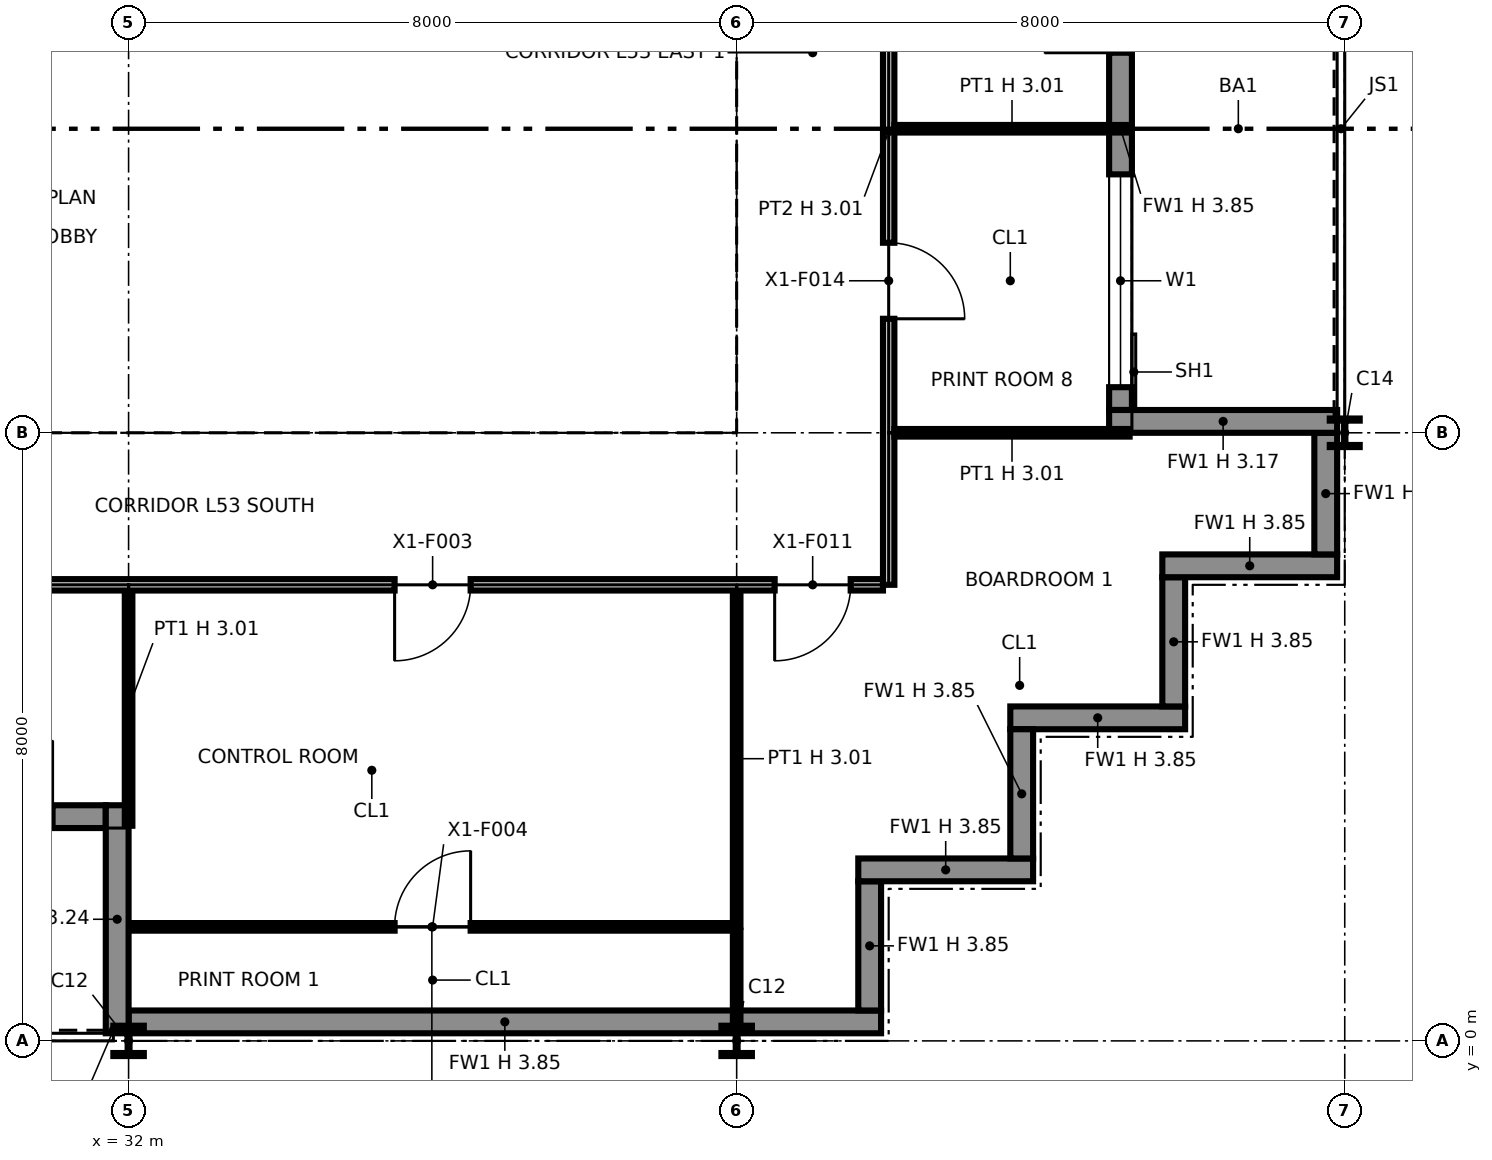
"""IFC4 building model, lengths in metres.
Left out: names, types, materials, properties, quantities, classifications, styles, units other than length and angle.
Written with IfcOpenShell. Run it as: python <this file> out.ifc"""

import sys

from ifc_helpers import new_model, si_unit, direction, frame, frame_2d, origin, origin_2d, place, context, subcontext, project, spatial, polyline, rectangle, i_section, outline, extrude, element, fill, save


model = new_model("IFC4")
c1 = context("Model", 3, precision=1e-05, world=origin(), true_north=direction((0.0, 1.0)))
c2 = subcontext(c1, "Body", "Model", "MODEL_VIEW")
j1 = project(units=[si_unit("LENGTHUNIT", "METRE"), si_unit("PLANEANGLEUNIT", "RADIAN")], contexts=[c1])
p1 = place(None, origin())
s1 = spatial("IfcSite", under=j1, at=p1, CompositionType="ELEMENT")
p2 = place(p1, origin())
s2 = spatial("IfcBuilding", under=s1, at=p2, CompositionType="ELEMENT")
p3 = place(p2, frame((0.0, 0.0, 247.0)))
s3 = spatial("IfcBuildingStorey", under=s2, at=p3, CompositionType="ELEMENT", Elevation=247.0)
p4 = place(p3, frame((32.0, 0.0, 0.0), z_axis=(0.0, 0.0, 1.0), x_axis=(1.0, 0.0, 0.0)))
e1 = element("IfcColumn", 1, at=p4, inside=s3, PredefinedType="COLUMN", context=c2, shape_type="SweptSolid", body=[
    extrude(i_section(OverallWidth=0.401, OverallDepth=0.399, WebThickness=0.025, FlangeThickness=0.04, at=origin_2d()), origin(), (0.0, 0.0, 1.0), 3.85),
])
p5 = place(p3, frame((32.0, 8.0, 0.0), z_axis=(0.0, 0.0, 1.0), x_axis=(1.0, 0.0, 0.0)))
e2 = element("IfcColumn", 2, at=p5, inside=s3, PredefinedType="COLUMN", context=c2, shape_type="SweptSolid", body=[
    extrude(i_section(OverallWidth=0.371, OverallDepth=0.361, WebThickness=0.012, FlangeThickness=0.02, at=origin_2d()), origin(), (0.0, 0.0, 1.0), 3.85),
])
p6 = place(p3, frame((40.0, 0.0, 0.0), z_axis=(0.0, 0.0, 1.0), x_axis=(1.0, 0.0, 0.0)))
e3 = element("IfcColumn", 3, at=p6, inside=s3, PredefinedType="COLUMN", context=c2, shape_type="SweptSolid", body=[
    extrude(i_section(OverallWidth=0.401, OverallDepth=0.399, WebThickness=0.025, FlangeThickness=0.04, at=origin_2d()), origin(), (0.0, 0.0, 1.0), 3.85),
])
p7 = place(p3, frame((40.0, 8.0, 0.0), z_axis=(0.0, 0.0, 1.0), x_axis=(1.0, 0.0, 0.0)))
e4 = element("IfcColumn", 4, at=p7, inside=s3, PredefinedType="COLUMN", context=c2, shape_type="SweptSolid", body=[
    extrude(i_section(OverallWidth=0.371, OverallDepth=0.361, WebThickness=0.012, FlangeThickness=0.02, at=origin_2d()), origin(), (0.0, 0.0, 1.0), 3.85),
])
p8 = place(p3, frame((48.0, 8.0, 0.0), z_axis=(0.0, 0.0, 1.0), x_axis=(1.0, 0.0, 0.0)))
e5 = element("IfcColumn", 5, at=p8, inside=s3, PredefinedType="COLUMN", context=c2, shape_type="SweptSolid", body=[
    extrude(i_section(OverallWidth=0.394, OverallDepth=0.376, WebThickness=0.017, FlangeThickness=0.028, at=origin_2d()), origin(), (0.0, 0.0, 1.0), 3.85),
])
p9 = place(p3, frame((24.3, 2.95, 0.0), z_axis=(0.0, 0.0, 1.0), x_axis=(1.0, 0.0, 0.0)))
e6 = element("IfcWall", 6, at=p9, inside=s3, PredefinedType="SOLIDWALL", context=c2, shape_type="SweptSolid", body=[
    extrude(rectangle(XDim=7.4, YDim=0.3, at=frame_2d((3.7, 0.0))), origin(), (0.0, 0.0, 1.0), 3.85),
])
p10 = place(p9, frame((0.3, 0.0, 0.9)))
e7 = element("IfcOpeningElement", 7, at=p10, cuts=e6, PredefinedType="OPENING", context=c2, shape_type="SweptSolid", body=[
    extrude(rectangle(XDim=2.8, YDim=2.2, at=frame_2d((1.4, 1.1))), frame((0.0, 0.16, 0.0), z_axis=(0.0, -1.0, 0.0), x_axis=(1.0, 0.0, 0.0)), (0.0, 0.0, 1.0), 0.32),
])
p11 = place(p9, frame((4.7, 0.0, 0.0)))
e8 = element("IfcOpeningElement", 8, at=p11, cuts=e6, PredefinedType="OPENING", context=c2, shape_type="SweptSolid", body=[
    extrude(rectangle(XDim=2.0, YDim=2.4, at=frame_2d((1.0, 1.2))), frame((0.0, 0.16, 0.0), z_axis=(0.0, -1.0, 0.0), x_axis=(1.0, 0.0, 0.0)), (0.0, 0.0, 1.0), 0.32),
])
p12 = place(p3, frame((31.85, 0.1, 0.0), z_axis=(0.0, 0.0, 1.0), x_axis=(0.0, 1.0, 0.0)))
e9 = element("IfcWall", 9, at=p12, inside=s3, PredefinedType="SOLIDWALL", context=c2, shape_type="SweptSolid", body=[
    extrude(rectangle(XDim=3.0, YDim=0.3, at=frame_2d((1.5, 0.0))), origin(), (0.0, 0.0, 1.0), 3.237),
])
p13 = place(p3, frame((32.0, 0.25, 0.0), z_axis=(0.0, 0.0, 1.0), x_axis=(1.0, 0.0, 0.0)))
e10 = element("IfcWall", 10, at=p13, inside=s3, PredefinedType="SOLIDWALL", context=c2, shape_type="SweptSolid", body=[
    extrude(rectangle(XDim=9.9, YDim=0.3, at=frame_2d((4.95, 0.0))), origin(), (0.0, 0.0, 1.0), 3.85),
])
p14 = place(p3, frame((41.75, 0.4, 0.0), z_axis=(0.0, 0.0, 1.0), x_axis=(0.0, 1.0, 0.0)))
e11 = element("IfcWall", 11, at=p14, inside=s3, PredefinedType="SOLIDWALL", context=c2, shape_type="SweptSolid", body=[
    extrude(rectangle(XDim=1.7, YDim=0.3, at=frame_2d((0.85, 0.0))), origin(), (0.0, 0.0, 1.0), 3.85),
])
p15 = place(p3, frame((41.6, 2.25, 0.0), z_axis=(0.0, 0.0, 1.0), x_axis=(1.0, 0.0, 0.0)))
e12 = element("IfcWall", 12, at=p15, inside=s3, PredefinedType="SOLIDWALL", context=c2, shape_type="SweptSolid", body=[
    extrude(rectangle(XDim=2.3, YDim=0.3, at=frame_2d((1.15, 0.0))), origin(), (0.0, 0.0, 1.0), 3.85),
])
p16 = place(p3, frame((43.75, 2.4, 0.0), z_axis=(0.0, 0.0, 1.0), x_axis=(0.0, 1.0, 0.0)))
e13 = element("IfcWall", 13, at=p16, inside=s3, PredefinedType="SOLIDWALL", context=c2, shape_type="SweptSolid", body=[
    extrude(rectangle(XDim=1.7, YDim=0.3, at=frame_2d((0.85, 0.0))), origin(), (0.0, 0.0, 1.0), 3.85),
])
p17 = place(p3, frame((43.6, 4.25, 0.0), z_axis=(0.0, 0.0, 1.0), x_axis=(1.0, 0.0, 0.0)))
e14 = element("IfcWall", 14, at=p17, inside=s3, PredefinedType="SOLIDWALL", context=c2, shape_type="SweptSolid", body=[
    extrude(rectangle(XDim=2.3, YDim=0.3, at=frame_2d((1.15, 0.0))), origin(), (0.0, 0.0, 1.0), 3.85),
])
p18 = place(p3, frame((45.75, 4.4, 0.0), z_axis=(0.0, 0.0, 1.0), x_axis=(0.0, 1.0, 0.0)))
e15 = element("IfcWall", 15, at=p18, inside=s3, PredefinedType="SOLIDWALL", context=c2, shape_type="SweptSolid", body=[
    extrude(rectangle(XDim=1.7, YDim=0.3, at=frame_2d((0.85, 0.0))), origin(), (0.0, 0.0, 1.0), 3.85),
])
p19 = place(p3, frame((45.6, 6.25, 0.0), z_axis=(0.0, 0.0, 1.0), x_axis=(1.0, 0.0, 0.0)))
e16 = element("IfcWall", 16, at=p19, inside=s3, PredefinedType="SOLIDWALL", context=c2, shape_type="SweptSolid", body=[
    extrude(rectangle(XDim=2.3, YDim=0.3, at=frame_2d((1.15, 0.0))), origin(), (0.0, 0.0, 1.0), 3.85),
])
p20 = place(p3, frame((47.75, 6.4, 0.0), z_axis=(0.0, 0.0, 1.0), x_axis=(0.0, 1.0, 0.0)))
e17 = element("IfcWall", 17, at=p20, inside=s3, PredefinedType="SOLIDWALL", context=c2, shape_type="SweptSolid", body=[
    extrude(rectangle(XDim=1.6, YDim=0.3, at=frame_2d((0.8, 0.0))), origin(), (0.0, 0.0, 1.0), 3.85),
])
p21 = place(p3, frame((45.05, 8.3, 0.0), z_axis=(0.0, 0.0, 1.0), x_axis=(0.0, 1.0, 0.0)))
e18 = element("IfcWall", 18, at=p21, inside=s3, PredefinedType="SOLIDWALL", context=c2, shape_type="SweptSolid", body=[
    extrude(rectangle(XDim=7.4, YDim=0.3, at=frame_2d((3.7, 0.0))), origin(), (0.0, 0.0, 1.0), 3.85),
])
p22 = place(p21, frame((0.3, 0.0, 0.9)))
e19 = element("IfcOpeningElement", 19, at=p22, cuts=e18, PredefinedType="OPENING", context=c2, shape_type="SweptSolid", body=[
    extrude(rectangle(XDim=2.8, YDim=2.2, at=frame_2d((1.4, 1.1))), frame((0.0, 0.16, 0.0), z_axis=(0.0, -1.0, 0.0), x_axis=(1.0, 0.0, 0.0)), (0.0, 0.0, 1.0), 0.32),
])
p23 = place(p21, frame((4.7, 0.0, 0.0)))
e20 = element("IfcOpeningElement", 20, at=p23, cuts=e18, PredefinedType="OPENING", context=c2, shape_type="SweptSolid", body=[
    extrude(rectangle(XDim=2.0, YDim=2.4, at=frame_2d((1.0, 1.2))), frame((0.0, 0.16, 0.0), z_axis=(0.0, -1.0, 0.0), x_axis=(1.0, 0.0, 0.0)), (0.0, 0.0, 1.0), 0.32),
])
p24 = place(p3, frame((47.9, 8.15, 0.0), z_axis=(0.0, 0.0, 1.0), x_axis=(-1.0, 0.0, 0.0)))
e21 = element("IfcWall", 21, at=p24, inside=s3, PredefinedType="SOLIDWALL", context=c2, shape_type="SweptSolid", body=[
    extrude(rectangle(XDim=3.0, YDim=0.3, at=frame_2d((1.5, 0.0))), origin(), (0.0, 0.0, 1.0), 3.171),
])
p25 = place(p3, frame((24.65, 8.75, 0.0), z_axis=(0.0, 0.0, 1.0), x_axis=(1.0, 0.0, 0.0)))
e22 = element("IfcWall", 22, at=p25, inside=s3, PredefinedType="PARTITIONING", context=c2, shape_type="SweptSolid", body=[
    extrude(outline(polyline([(0.0, 0.0), (14.7, 0.0), (14.7, 3.85), (7.438, 3.85), (7.438, 3.308), (7.262, 3.308), (7.261, 3.85), (0.0, 3.85), (0.0, 0.0)])), frame((0.0, 0.1, 0.0), z_axis=(0.0, -1.0, 0.0), x_axis=(1.0, 0.0, 0.0)), (0.0, 0.0, 1.0), 0.2),
])
p26 = place(p3, frame((24.85, 11.5, 0.0), z_axis=(0.0, 0.0, 1.0), x_axis=(1.0, 0.0, 0.0)))
e23 = element("IfcWall", 23, at=p26, inside=s3, PredefinedType="PARTITIONING", context=c2, shape_type="SweptSolid", body=[
    extrude(outline(polyline([(0.0, 0.0), (7.45, 0.0), (7.45, 3.85), (7.239, 3.85), (7.238, 3.308), (7.062, 3.308), (7.062, 3.85), (0.0, 3.85), (0.0, 0.0)])), frame((0.0, 0.1, 0.0), z_axis=(0.0, -1.0, 0.0), x_axis=(1.0, 0.0, 0.0)), (0.0, 0.0, 1.0), 0.2),
])
p27 = place(p26, frame((0.575, 0.0, 0.0)))
e24 = element("IfcOpeningElement", 24, at=p27, cuts=e23, PredefinedType="OPENING", context=c2, shape_type="SweptSolid", body=[
    extrude(rectangle(XDim=1.1, YDim=2.1, at=frame_2d((0.55, 1.05))), frame((0.0, 0.11, 0.0), z_axis=(0.0, -1.0, 0.0), x_axis=(1.0, 0.0, 0.0)), (0.0, 0.0, 1.0), 0.22),
])
p28 = place(p26, frame((2.95, 0.0, 0.0)))
e25 = element("IfcOpeningElement", 25, at=p28, cuts=e23, PredefinedType="OPENING", context=c2, shape_type="SweptSolid", body=[
    extrude(rectangle(XDim=1.1, YDim=2.1, at=frame_2d((0.55, 1.05))), frame((0.0, 0.11, 0.0), z_axis=(0.0, -1.0, 0.0), x_axis=(1.0, 0.0, 0.0)), (0.0, 0.0, 1.0), 0.22),
])
p29 = place(p26, frame((5.25, 0.0, 0.0)))
e26 = element("IfcOpeningElement", 26, at=p29, cuts=e23, PredefinedType="OPENING", context=c2, shape_type="SweptSolid", body=[
    extrude(rectangle(XDim=1.1, YDim=2.1, at=frame_2d((0.55, 1.05))), frame((0.0, 0.11, 0.0), z_axis=(0.0, -1.0, 0.0), x_axis=(1.0, 0.0, 0.0)), (0.0, 0.0, 1.0), 0.22),
])
p30 = place(p3, frame((32.0, 8.85, 0.0), z_axis=(0.0, 0.0, 1.0), x_axis=(0.0, 1.0, 0.0)))
e27 = element("IfcWall", 27, at=p30, inside=s3, PredefinedType="PARTITIONING", context=c2, shape_type="SweptSolid", body=[
    extrude(rectangle(XDim=2.55, YDim=0.6, at=frame_2d((1.275, 0.0))), origin(), (0.0, 0.0, 1.0), 3.308),
])
p31 = place(p3, frame((32.0, 11.6, 0.0), z_axis=(0.0, 0.0, 1.0), x_axis=(0.0, 1.0, 0.0)))
e28 = element("IfcWall", 28, at=p31, inside=s3, PredefinedType="PARTITIONING", context=c2, shape_type="SweptSolid", body=[
    extrude(rectangle(XDim=1.8, YDim=0.6, at=frame_2d((0.9, 0.0))), origin(), (0.0, 0.0, 1.0), 3.308),
])
for number, where, z_axis, x_axis in (
    (29, (35.6, 8.85, 0.0), (0.0, 0.0, 1.0), (0.0, 1.0, 0.0)),
    (30, (39.25, 8.85, 0.0), (0.0, 0.0, 1.0), (0.0, 1.0, 0.0)),
):
    element("IfcWall", number, at=place(p3, frame(where, z_axis=z_axis, x_axis=x_axis)), inside=s3, PredefinedType="PARTITIONING", context=c2, shape_type="SweptSolid", body=[
        extrude(rectangle(XDim=6.3, YDim=0.2, at=frame_2d((3.15, 0.0))), origin(), (0.0, 0.0, 1.0), 3.85),
    ])
p32 = place(p3, frame((40.0, 0.13, 0.0), z_axis=(0.0, 0.0, 1.0), x_axis=(0.0, 1.0, 0.0)))
e31 = element("IfcWall", 31, at=p32, inside=s3, PredefinedType="PARTITIONING", context=c2, shape_type="SweptSolid", body=[
    extrude(rectangle(XDim=1.32, YDim=0.1, at=frame_2d((0.66, 0.0))), origin(), (0.0, 0.0, 1.0), 3.014),
])
p33 = place(p3, frame((32.03, 1.5, 0.0), z_axis=(0.0, 0.0, 1.0), x_axis=(1.0, 0.0, 0.0)))
e32 = element("IfcWall", 32, at=p33, inside=s3, PredefinedType="PARTITIONING", context=c2, shape_type="SweptSolid", body=[
    extrude(rectangle(XDim=7.92, YDim=0.1, at=frame_2d((3.96, 0.0))), origin(), (0.0, 0.0, 1.0), 3.85),
])
p34 = place(p33, frame((3.47, 0.0, 0.0)))
e33 = element("IfcOpeningElement", 33, at=p34, cuts=e32, PredefinedType="OPENING", context=c2, shape_type="SweptSolid", body=[
    extrude(rectangle(XDim=1.0, YDim=2.1, at=frame_2d((0.5, 1.05))), frame((0.0, 0.06, 0.0), z_axis=(0.0, -1.0, 0.0), x_axis=(1.0, 0.0, 0.0)), (0.0, 0.0, 1.0), 0.12),
])
p35 = place(p3, frame((40.0, 1.5, 0.0), z_axis=(0.0, 0.0, 1.0), x_axis=(0.0, 1.0, 0.0)))
e34 = element("IfcWall", 34, at=p35, inside=s3, PredefinedType="PARTITIONING", context=c2, shape_type="SweptSolid", body=[
    extrude(rectangle(XDim=4.425, YDim=0.1, at=frame_2d((2.212, 0.0))), origin(), (0.0, 0.0, 1.0), 3.014),
])
p36 = place(p3, frame((32.0, 2.83, 0.0), z_axis=(0.0, 0.0, 1.0), x_axis=(0.0, 1.0, 0.0)))
e35 = element("IfcWall", 35, at=p36, inside=s3, PredefinedType="PARTITIONING", context=c2, shape_type="SweptSolid", body=[
    extrude(rectangle(XDim=3.095, YDim=0.1, at=frame_2d((1.547, 0.0))), origin(), (0.0, 0.0, 1.0), 3.014),
])
p37 = place(p3, frame((6.075, 6.0, 0.0), z_axis=(0.0, 0.0, 1.0), x_axis=(1.0, 0.0, 0.0)))
e36 = element("IfcWall", 36, at=p37, inside=s3, PredefinedType="PARTITIONING", context=c2, shape_type="SweptSolid", body=[
    extrude(rectangle(XDim=35.85, YDim=0.15, at=frame_2d((17.925, 0.0))), origin(), (0.0, 0.0, 1.0), 3.85),
])
p38 = place(p37, frame((14.425, 0.0, 0.0), z_axis=(0.0, 0.0, 1.0), x_axis=(-1.0, 0.0, 0.0)))
e37 = element("IfcOpeningElement", 37, at=p38, cuts=e36, PredefinedType="OPENING", context=c2, shape_type="SweptSolid", body=[
    extrude(rectangle(XDim=1.0, YDim=2.1, at=frame_2d((0.5, 1.05))), frame((0.0, 0.085, 0.0), z_axis=(0.0, -1.0, 0.0), x_axis=(1.0, 0.0, 0.0)), (0.0, 0.0, 1.0), 0.17),
])
p39 = place(p37, frame((30.425, 0.0, 0.0), z_axis=(0.0, 0.0, 1.0), x_axis=(-1.0, 0.0, 0.0)))
e38 = element("IfcOpeningElement", 38, at=p39, cuts=e36, PredefinedType="OPENING", context=c2, shape_type="SweptSolid", body=[
    extrude(rectangle(XDim=1.0, YDim=2.1, at=frame_2d((0.5, 1.05))), frame((0.0, 0.085, 0.0), z_axis=(0.0, -1.0, 0.0), x_axis=(1.0, 0.0, 0.0)), (0.0, 0.0, 1.0), 0.17),
])
p40 = place(p37, frame((4.425, 0.0, 0.0), z_axis=(0.0, 0.0, 1.0), x_axis=(-1.0, 0.0, 0.0)))
e39 = element("IfcOpeningElement", 39, at=p40, cuts=e36, PredefinedType="OPENING", context=c2, shape_type="SweptSolid", body=[
    extrude(rectangle(XDim=1.0, YDim=2.1, at=frame_2d((0.5, 1.05))), frame((0.0, 0.085, 0.0), z_axis=(0.0, -1.0, 0.0), x_axis=(1.0, 0.0, 0.0)), (0.0, 0.0, 1.0), 0.17),
])
p41 = place(p37, frame((8.425, 0.0, 0.0), z_axis=(0.0, 0.0, 1.0), x_axis=(-1.0, 0.0, 0.0)))
e40 = element("IfcOpeningElement", 40, at=p41, cuts=e36, PredefinedType="OPENING", context=c2, shape_type="SweptSolid", body=[
    extrude(rectangle(XDim=1.0, YDim=2.1, at=frame_2d((0.5, 1.05))), frame((0.0, 0.085, 0.0), z_axis=(0.0, -1.0, 0.0), x_axis=(1.0, 0.0, 0.0)), (0.0, 0.0, 1.0), 0.17),
])
p42 = place(p37, frame((19.425, 0.0, 0.0), z_axis=(0.0, 0.0, 1.0), x_axis=(-1.0, 0.0, 0.0)))
e41 = element("IfcOpeningElement", 41, at=p42, cuts=e36, PredefinedType="OPENING", context=c2, shape_type="SweptSolid", body=[
    extrude(rectangle(XDim=1.0, YDim=2.1, at=frame_2d((0.5, 1.05))), frame((0.0, 0.085, 0.0), z_axis=(0.0, -1.0, 0.0), x_axis=(1.0, 0.0, 0.0)), (0.0, 0.0, 1.0), 0.17),
])
p43 = place(p37, frame((24.425, 0.0, 0.0), z_axis=(0.0, 0.0, 1.0), x_axis=(-1.0, 0.0, 0.0)))
e42 = element("IfcOpeningElement", 42, at=p43, cuts=e36, PredefinedType="OPENING", context=c2, shape_type="SweptSolid", body=[
    extrude(rectangle(XDim=1.0, YDim=2.1, at=frame_2d((0.5, 1.05))), frame((0.0, 0.085, 0.0), z_axis=(0.0, -1.0, 0.0), x_axis=(1.0, 0.0, 0.0)), (0.0, 0.0, 1.0), 0.17),
])
p44 = place(p37, frame((35.425, 0.0, 0.0), z_axis=(0.0, 0.0, 1.0), x_axis=(-1.0, 0.0, 0.0)))
e43 = element("IfcOpeningElement", 43, at=p44, cuts=e36, PredefinedType="OPENING", context=c2, shape_type="SweptSolid", body=[
    extrude(rectangle(XDim=1.0, YDim=2.1, at=frame_2d((0.5, 1.05))), frame((0.0, 0.085, 0.0), z_axis=(0.0, -1.0, 0.0), x_axis=(1.0, 0.0, 0.0)), (0.0, 0.0, 1.0), 0.17),
])
p45 = place(p3, frame((42.0, 6.0, 0.0), z_axis=(0.0, 0.0, 1.0), x_axis=(0.0, 1.0, 0.0)))
e44 = element("IfcWall", 44, at=p45, inside=s3, PredefinedType="PARTITIONING", context=c2, shape_type="SweptSolid", body=[
    extrude(rectangle(XDim=11.925, YDim=0.15, at=frame_2d((5.962, 0.0))), origin(), (0.0, 0.0, 1.0), 3.014),
])
p46 = place(p45, frame((4.5, 0.0, 0.0), z_axis=(0.0, 0.0, 1.0), x_axis=(-1.0, 0.0, 0.0)))
e45 = element("IfcOpeningElement", 45, at=p46, cuts=e44, PredefinedType="OPENING", context=c2, shape_type="SweptSolid", body=[
    extrude(rectangle(XDim=1.0, YDim=2.1, at=frame_2d((0.5, 1.05))), frame((0.0, 0.085, 0.0), z_axis=(0.0, -1.0, 0.0), x_axis=(1.0, 0.0, 0.0)), (0.0, 0.0, 1.0), 0.17),
])
p47 = place(p45, frame((8.5, 0.0, 0.0), z_axis=(0.0, 0.0, 1.0), x_axis=(-1.0, 0.0, 0.0)))
e46 = element("IfcOpeningElement", 46, at=p47, cuts=e44, PredefinedType="OPENING", context=c2, shape_type="SweptSolid", body=[
    extrude(rectangle(XDim=1.0, YDim=2.1, at=frame_2d((0.5, 1.05))), frame((0.0, 0.085, 0.0), z_axis=(0.0, -1.0, 0.0), x_axis=(1.0, 0.0, 0.0)), (0.0, 0.0, 1.0), 0.17),
])
p48 = place(p45, frame((11.5, 0.0, 0.0), z_axis=(0.0, 0.0, 1.0), x_axis=(-1.0, 0.0, 0.0)))
e47 = element("IfcOpeningElement", 47, at=p48, cuts=e44, PredefinedType="OPENING", context=c2, shape_type="SweptSolid", body=[
    extrude(rectangle(XDim=1.0, YDim=2.1, at=frame_2d((0.5, 1.05))), frame((0.0, 0.085, 0.0), z_axis=(0.0, -1.0, 0.0), x_axis=(1.0, 0.0, 0.0)), (0.0, 0.0, 1.0), 0.17),
])
for number, where, z_axis, x_axis in (
    (48, (42.075, 8.0, 0.0), (0.0, 0.0, 1.0), (1.0, 0.0, 0.0)),
    (49, (42.075, 12.0, 0.0), (0.0, 0.0, 1.0), (1.0, 0.0, 0.0)),
):
    element("IfcWall", number, at=place(p3, frame(where, z_axis=z_axis, x_axis=x_axis)), inside=s3, PredefinedType="PARTITIONING", context=c2, shape_type="SweptSolid", body=[
        extrude(rectangle(XDim=3.095, YDim=0.1, at=frame_2d((1.547, 0.0))), origin(), (0.0, 0.0, 1.0), 3.014),
    ])
p49 = place(p22, origin())
e50 = element("IfcWindow", 50, at=p49, inside=s3, PartitioningType="SINGLE_PANEL", PredefinedType="WINDOW", context=c2, shape_type="SweptSolid", body=[
    extrude(rectangle(XDim=2.8, YDim=2.2, at=frame_2d((1.4, 1.1))), frame((0.0, 0.03, 0.0), z_axis=(0.0, -1.0, 0.0), x_axis=(1.0, 0.0, 0.0)), (0.0, 0.0, 1.0), 0.06),
])
fill(e19, e50)
p50 = place(p29, origin())
e51 = element("IfcDoor", 51, at=p50, inside=s3, OperationType="SLIDING_TO_LEFT", PredefinedType="NOTDEFINED", context=c2, shape_type="SweptSolid", body=[
    extrude(rectangle(XDim=1.1, YDim=2.1, at=frame_2d((0.55, 1.05))), frame((0.0, 0.025, 0.0), z_axis=(0.0, -1.0, 0.0), x_axis=(1.0, 0.0, 0.0)), (0.0, 0.0, 1.0), 0.05),
])
fill(e26, e51)
p51 = place(p39, origin())
e52 = element("IfcDoor", 52, at=p51, inside=s3, OperationType="SINGLE_SWING_RIGHT", PredefinedType="DOOR", context=c2, shape_type="SweptSolid", body=[
    extrude(rectangle(XDim=1.0, YDim=2.1, at=frame_2d((0.5, 1.05))), frame((0.0, 0.025, 0.0), z_axis=(0.0, -1.0, 0.0), x_axis=(1.0, 0.0, 0.0)), (0.0, 0.0, 1.0), 0.05),
])
fill(e38, e52)
p52 = place(p34, origin())
e53 = element("IfcDoor", 53, at=p52, inside=s3, OperationType="SINGLE_SWING_RIGHT", PredefinedType="DOOR", context=c2, shape_type="SweptSolid", body=[
    extrude(rectangle(XDim=1.0, YDim=2.1, at=frame_2d((0.5, 1.05))), frame((0.0, 0.025, 0.0), z_axis=(0.0, -1.0, 0.0), x_axis=(1.0, 0.0, 0.0)), (0.0, 0.0, 1.0), 0.05),
])
fill(e33, e53)
p53 = place(p44, origin())
e54 = element("IfcDoor", 54, at=p53, inside=s3, OperationType="SINGLE_SWING_RIGHT", PredefinedType="DOOR", context=c2, shape_type="SweptSolid", body=[
    extrude(rectangle(XDim=1.0, YDim=2.1, at=frame_2d((0.5, 1.05))), frame((0.0, 0.025, 0.0), z_axis=(0.0, -1.0, 0.0), x_axis=(1.0, 0.0, 0.0)), (0.0, 0.0, 1.0), 0.05),
])
fill(e43, e54)
p54 = place(p46, origin())
e55 = element("IfcDoor", 55, at=p54, inside=s3, OperationType="SINGLE_SWING_RIGHT", PredefinedType="DOOR", context=c2, shape_type="SweptSolid", body=[
    extrude(rectangle(XDim=1.0, YDim=2.1, at=frame_2d((0.5, 1.05))), frame((0.0, 0.025, 0.0), z_axis=(0.0, -1.0, 0.0), x_axis=(1.0, 0.0, 0.0)), (0.0, 0.0, 1.0), 0.05),
])
fill(e45, e55)
save(model, sys.argv[1])
